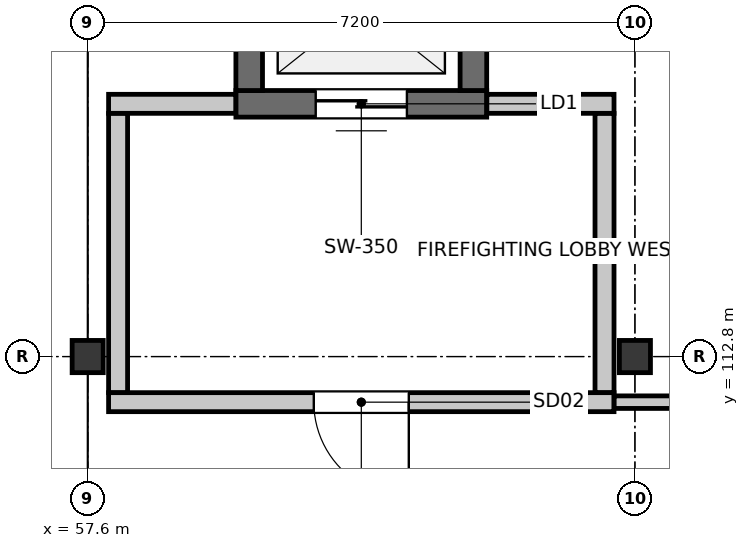
"""IFC4 building model, lengths in metres.
Left out: names, types, materials, properties, quantities, classifications, styles, units other than length and angle.
Written with IfcOpenShell. Run it as: python <this file> out.ifc"""

import sys

from ifc_helpers import new_model, si_unit, direction, frame, frame_2d, origin, origin_2d, place, context, subcontext, project, spatial, rectangle, i_section, extrude, element, fill, save


model = new_model("IFC4")
c1 = context("Model", 3, precision=1e-05, world=origin(), true_north=direction((0.0, 1.0)))
c2 = subcontext(c1, "Body", "Model", "MODEL_VIEW")
j1 = project(units=[si_unit("LENGTHUNIT", "METRE"), si_unit("PLANEANGLEUNIT", "RADIAN")], contexts=[c1])
p1 = place(None, origin())
s1 = spatial("IfcSite", under=j1, at=p1, CompositionType="ELEMENT")
p2 = place(p1, origin())
s2 = spatial("IfcBuilding", under=s1, at=p2, CompositionType="ELEMENT")
p3 = place(p2, frame((0.0, 0.0, -4.5)))
s3 = spatial("IfcBuildingStorey", under=s2, at=p3, CompositionType="ELEMENT", Elevation=-4.5)
for number, where, z_axis, x_axis in (
    (1, (57.6, 112.8, 0.0), (0.0, 0.0, 1.0), (1.0, 0.0, 0.0)),
    (2, (64.8, 112.8, 0.0), (0.0, 0.0, 1.0), (1.0, 0.0, 0.0)),
):
    element("IfcColumn", number, at=place(p3, frame(where, z_axis=z_axis, x_axis=x_axis)), inside=s3, PredefinedType="COLUMN", context=c2, shape_type="SweptSolid", body=[
        extrude(i_section(OverallWidth=0.409, OverallDepth=0.424, WebThickness=0.033, FlangeThickness=0.052, FilletRadius=0.015, at=origin_2d()), origin(), (0.0, 0.0, 1.0), 4.5),
    ])
p4 = place(p3, frame((62.85, 116.125, 0.0), z_axis=(0.0, 0.0, 1.0), x_axis=(-1.0, 0.0, 0.0)))
e3 = element("IfcWall", 3, at=p4, inside=s3, PredefinedType="SHEAR", context=c2, shape_type="SweptSolid", body=[
    extrude(rectangle(XDim=3.3, YDim=0.35, at=frame_2d((1.65, 0.0))), origin(), (0.0, 0.0, 1.0), 4.22),
])
p5 = place(p4, frame((1.05, 0.0, 0.0)))
e4 = element("IfcOpeningElement", 4, at=p5, cuts=e3, PredefinedType="OPENING", context=c2, shape_type="SweptSolid", body=[
    extrude(rectangle(XDim=1.2, YDim=2.2, at=frame_2d((0.6, 1.1))), frame((0.0, 0.185, 0.0), z_axis=(0.0, -1.0, 0.0), x_axis=(1.0, 0.0, 0.0)), (0.0, 0.0, 1.0), 0.37),
])
for number, where, z_axis, x_axis in (
    (5, (59.725, 116.3, 0.0), (0.0, 0.0, 1.0), (0.0, 1.0, 0.0)),
    (6, (62.675, 118.5, 0.0), (0.0, 0.0, 1.0), (0.0, -1.0, 0.0)),
):
    element("IfcWall", number, at=place(p3, frame(where, z_axis=z_axis, x_axis=x_axis)), inside=s3, PredefinedType="SHEAR", context=c2, shape_type="SweptSolid", body=[
        extrude(rectangle(XDim=2.2, YDim=0.35, at=frame_2d((1.1, 0.0))), origin(), (0.0, 0.0, 1.0), 4.22),
    ])
p6 = place(p3, frame((64.525, 112.2, 0.0), z_axis=(0.0, 0.0, 1.0), x_axis=(-1.0, 0.0, 0.0)))
e7 = element("IfcWall", 7, at=p6, inside=s3, PredefinedType="PARTITIONING", context=c2, shape_type="SweptSolid", body=[
    extrude(rectangle(XDim=6.65, YDim=0.25, at=frame_2d((3.325, 0.0))), origin(), (0.0, 0.0, 1.0), 3.443),
])
p7 = place(p6, frame((2.7, 0.0, 0.0)))
e8 = element("IfcOpeningElement", 8, at=p7, cuts=e7, PredefinedType="OPENING", context=c2, shape_type="SweptSolid", body=[
    extrude(rectangle(XDim=1.25, YDim=2.2, at=frame_2d((0.625, 1.1))), frame((0.0, 0.135, 0.0), z_axis=(0.0, -1.0, 0.0), x_axis=(1.0, 0.0, 0.0)), (0.0, 0.0, 1.0), 0.27),
])
p8 = place(p3, frame((57.875, 116.125, 0.0), z_axis=(0.0, 0.0, 1.0), x_axis=(1.0, 0.0, 0.0)))
e9 = element("IfcWall", 9, at=p8, inside=s3, PredefinedType="PARTITIONING", context=c2, shape_type="SweptSolid", body=[
    extrude(rectangle(XDim=1.673, YDim=0.25, at=frame_2d((0.836, 0.0))), origin(), (0.0, 0.0, 1.0), 3.443),
])
p9 = place(p3, frame((62.852, 116.125, 0.0), z_axis=(0.0, 0.0, 1.0), x_axis=(1.0, 0.0, 0.0)))
e10 = element("IfcWall", 10, at=p9, inside=s3, PredefinedType="PARTITIONING", context=c2, shape_type="SweptSolid", body=[
    extrude(rectangle(XDim=1.673, YDim=0.25, at=frame_2d((0.836, 0.0))), origin(), (0.0, 0.0, 1.0), 3.443),
])
for number, where, z_axis, x_axis in (
    (11, (58.0, 112.327, 0.0), (0.0, 0.0, 1.0), (0.0, 1.0, 0.0)),
    (12, (64.4, 115.998, 0.0), (0.0, 0.0, 1.0), (0.0, -1.0, 0.0)),
):
    element("IfcWall", number, at=place(p3, frame(where, z_axis=z_axis, x_axis=x_axis)), inside=s3, PredefinedType="PARTITIONING", context=c2, shape_type="SweptSolid", body=[
        extrude(rectangle(XDim=3.671, YDim=0.25, at=frame_2d((1.835, 0.0))), origin(), (0.0, 0.0, 1.0), 3.443),
    ])
p10 = place(p3, frame((79.28, 112.2, 0.0), z_axis=(0.0, 0.0, 1.0), x_axis=(-1.0, 0.0, 0.0)))
e13 = element("IfcWall", 13, at=p10, inside=s3, PredefinedType="PARTITIONING", context=c2, shape_type="SweptSolid", body=[
    extrude(rectangle(XDim=14.753, YDim=0.165, at=frame_2d((7.376, 0.0))), origin(), (0.0, 0.0, 1.0), 3.443),
])
p11 = place(p10, frame((7.906, 0.0, 0.0)))
e14 = element("IfcOpeningElement", 14, at=p11, cuts=e13, PredefinedType="OPENING", context=c2, shape_type="SweptSolid", body=[
    extrude(rectangle(XDim=0.94, YDim=2.1, at=frame_2d((0.47, 1.05))), frame((0.0, 0.093, 0.0), z_axis=(0.0, -1.0, 0.0), x_axis=(1.0, 0.0, 0.0)), (0.0, 0.0, 1.0), 0.185),
])
p12 = place(p5, origin())
e15 = element("IfcDoor", 15, at=p12, inside=s3, OperationType="DOUBLE_DOOR_SLIDING", PredefinedType="DOOR", context=c2, shape_type="SweptSolid", body=[
    extrude(rectangle(XDim=1.2, YDim=2.2, at=frame_2d((0.6, 1.1))), frame((0.0, 0.025, 0.0), z_axis=(0.0, -1.0, 0.0), x_axis=(1.0, 0.0, 0.0)), (0.0, 0.0, 1.0), 0.05),
])
fill(e4, e15)
p13 = place(p7, origin())
e16 = element("IfcDoor", 16, at=p13, inside=s3, OperationType="SINGLE_SWING_LEFT", PredefinedType="DOOR", context=c2, shape_type="SweptSolid", body=[
    extrude(rectangle(XDim=1.25, YDim=2.2, at=frame_2d((0.625, 1.1))), frame((0.0, 0.025, 0.0), z_axis=(0.0, -1.0, 0.0), x_axis=(1.0, 0.0, 0.0)), (0.0, 0.0, 1.0), 0.05),
])
fill(e8, e16)
save(model, sys.argv[1])
